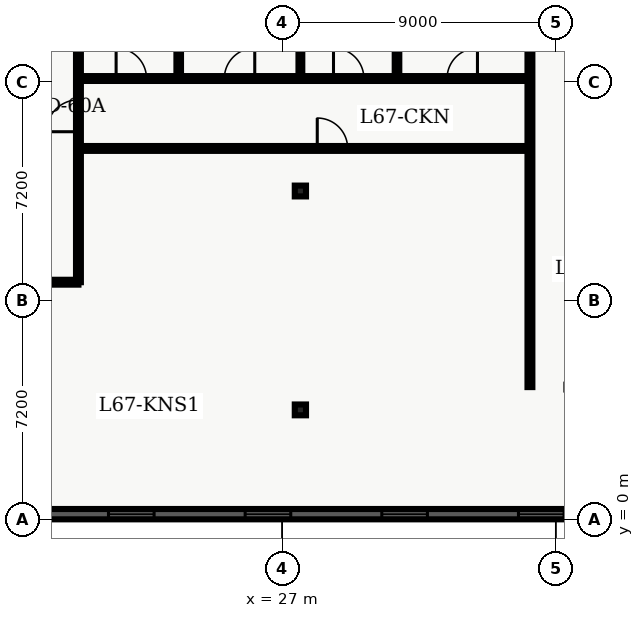
"""IFC4 building model, lengths in metres.
Left out: names, types, materials, properties, quantities, classifications, styles, units other than length and angle.
Written with IfcOpenShell. Run it as: python <this file> out.ifc"""

import sys

from ifc_helpers import new_model, entity, si_unit, converted_unit, direction, frame, origin_with_axes, origin_2d_with_axis, place, context, subcontext, project, spatial, polyline, rectangle, i_section, outline, extrude, element, fill, save


model = new_model("IFC4")
c1 = context("Model", 3, precision=1e-05, world=origin_with_axes(), true_north=direction((0.0, 1.0)))
c2 = subcontext(c1, "Body", "Model", "MODEL_VIEW")
j1 = project(units=[si_unit("LENGTHUNIT", "METRE"), converted_unit("PLANEANGLEUNIT", "DEGREE", entity("IfcPlaneAngleMeasure", 0.017), si_unit("PLANEANGLEUNIT", "RADIAN"), dimensions=[0, 0, 0, 0, 0, 0, 0])], contexts=[c1])
p1 = place(None, origin_with_axes())
s1 = spatial("IfcSite", under=j1, at=p1, CompositionType="ELEMENT")
p2 = place(p1, origin_with_axes())
s2 = spatial("IfcBuilding", under=s1, at=p2, CompositionType="ELEMENT")
p3 = place(p2, frame((0.0, 0.0, 272.4), z_axis=(0.0, 0.0, 1.0), x_axis=(1.0, 0.0, 0.0)))
s3 = spatial("IfcBuildingStorey", under=s2, at=p3, CompositionType="ELEMENT", Elevation=272.4)
for number, where, z_axis, x_axis in (
    (1, (27.6, 3.6, 0.0), (0.0, 0.0, 1.0), (1.0, 0.0, 0.0)),
    (2, (27.6, 10.8, 0.0), (0.0, 0.0, 1.0), (1.0, 0.0, 0.0)),
):
    element("IfcColumn", number, at=place(p3, frame(where, z_axis=z_axis, x_axis=x_axis)), inside=s3, PredefinedType="COLUMN", context=c2, shape_type="SweptSolid", body=[
        extrude(i_section(OverallWidth=0.369, OverallDepth=0.356, WebThickness=0.011, FlangeThickness=0.018, FilletRadius=0.018, at=origin_2d_with_axis()), origin_with_axes(), (0.0, 0.0, 1.0), 3.9),
    ])
p4 = place(p3, frame((8.135, 7.8, 0.0), z_axis=(0.0, 0.0, 1.0), x_axis=(1.0, 0.0, 0.0)))
e3 = element("IfcWall", 3, at=p4, inside=s3, PredefinedType="PARTITIONING", context=c2, shape_type="SweptSolid", body=[
    extrude(outline(polyline([(0.0, -0.08), (12.165, -0.08), (12.165, 0.08), (0.0, 0.08), (0.0, -0.08)])), origin_with_axes(), (0.0, 0.0, 1.0), 2.7),
])
p5 = place(p4, frame((3.994, 0.0, 0.0), z_axis=(0.0, 0.0, 1.0), x_axis=(1.0, 0.0, 0.0)))
e4 = element("IfcOpeningElement", 4, at=p5, cuts=e3, PredefinedType="OPENING", context=c2, shape_type="SweptSolid", body=[
    extrude(rectangle(XDim=1.0, YDim=0.18, at=origin_2d_with_axis()), origin_with_axes(), (0.0, 0.0, 1.0), 2.15),
])
p6 = place(p4, frame((8.794, 0.0, 0.0), z_axis=(0.0, 0.0, 1.0), x_axis=(1.0, 0.0, 0.0)))
e5 = element("IfcOpeningElement", 5, at=p6, cuts=e3, PredefinedType="OPENING", context=c2, shape_type="SweptSolid", body=[
    extrude(rectangle(XDim=1.0, YDim=0.18, at=origin_2d_with_axis()), origin_with_axes(), (0.0, 0.0, 1.0), 2.15),
])
p7 = place(p3, frame((20.3, 7.8, 0.0), z_axis=(0.0, 0.0, 1.0), x_axis=(0.0, 1.0, 0.0)))
e6 = element("IfcWall", 6, at=p7, inside=s3, PredefinedType="PARTITIONING", context=c2, shape_type="SweptSolid", body=[
    extrude(outline(polyline([(0.0, -0.08), (32.7, -0.08), (32.7, 0.08), (0.0, 0.08), (0.0, -0.08)])), origin_with_axes(), (0.0, 0.0, 1.0), 2.7),
])
p8 = place(p7, frame((14.2, 0.0, 0.0), z_axis=(0.0, 0.0, 1.0), x_axis=(1.0, 0.0, 0.0)))
e7 = element("IfcOpeningElement", 7, at=p8, cuts=e6, PredefinedType="OPENING", context=c2, shape_type="SweptSolid", body=[
    extrude(rectangle(XDim=1.0, YDim=0.18, at=origin_2d_with_axis()), origin_with_axes(), (0.0, 0.0, 1.0), 2.15),
])
p9 = place(p7, frame((18.779, 0.0, 0.0), z_axis=(0.0, 0.0, 1.0), x_axis=(1.0, 0.0, 0.0)))
e8 = element("IfcOpeningElement", 8, at=p9, cuts=e6, PredefinedType="OPENING", context=c2, shape_type="SweptSolid", body=[
    extrude(rectangle(XDim=1.0, YDim=0.18, at=origin_2d_with_axis()), origin_with_axes(), (0.0, 0.0, 1.0), 2.15),
])
p10 = place(p7, frame((23.784, 0.0, 0.0), z_axis=(0.0, 0.0, 1.0), x_axis=(1.0, 0.0, 0.0)))
e9 = element("IfcOpeningElement", 9, at=p10, cuts=e6, PredefinedType="OPENING", context=c2, shape_type="SweptSolid", body=[
    extrude(rectangle(XDim=1.0, YDim=0.18, at=origin_2d_with_axis()), origin_with_axes(), (0.0, 0.0, 1.0), 2.15),
])
p11 = place(p7, frame((27.651, 0.0, 0.0), z_axis=(0.0, 0.0, 1.0), x_axis=(1.0, 0.0, 0.0)))
e10 = element("IfcOpeningElement", 10, at=p11, cuts=e6, PredefinedType="OPENING", context=c2, shape_type="SweptSolid", body=[
    extrude(rectangle(XDim=1.0, YDim=0.18, at=origin_2d_with_axis()), origin_with_axes(), (0.0, 0.0, 1.0), 2.15),
])
p12 = place(p7, frame((5.475, 0.0, 0.0), z_axis=(0.0, 0.0, 1.0), x_axis=(1.0, 0.0, 0.0)))
e11 = element("IfcOpeningElement", 11, at=p12, cuts=e6, PredefinedType="OPENING", context=c2, shape_type="SweptSolid", body=[
    extrude(rectangle(XDim=1.05, YDim=0.18, at=origin_2d_with_axis()), origin_with_axes(), (0.0, 0.0, 1.0), 2.15),
])
p13 = place(p3, frame((20.3, 12.2, 0.0), z_axis=(0.0, 0.0, 1.0), x_axis=(1.0, 0.0, 0.0)))
e12 = element("IfcWall", 12, at=p13, inside=s3, PredefinedType="PARTITIONING", context=c2, shape_type="SweptSolid", body=[
    extrude(outline(polyline([(0.0, -0.08), (14.85, -0.08), (14.85, 0.08), (0.0, 0.08), (0.0, -0.08)])), origin_with_axes(), (0.0, 0.0, 1.0), 2.7),
])
p14 = place(p13, frame((8.355, 0.0, 0.0), z_axis=(0.0, 0.0, 1.0), x_axis=(1.0, 0.0, 0.0)))
e13 = element("IfcOpeningElement", 13, at=p14, cuts=e12, PredefinedType="OPENING", context=c2, shape_type="SweptSolid", body=[
    extrude(rectangle(XDim=1.0, YDim=0.18, at=origin_2d_with_axis()), origin_with_axes(), (0.0, 0.0, 1.0), 2.15),
])
p15 = place(p3, frame((20.3, 14.5, 0.0), z_axis=(0.0, 0.0, 1.0), x_axis=(1.0, 0.0, 0.0)))
e14 = element("IfcWall", 14, at=p15, inside=s3, PredefinedType="PARTITIONING", context=c2, shape_type="SweptSolid", body=[
    extrude(outline(polyline([(0.0, -0.08), (14.85, -0.08), (14.85, 0.08), (0.0, 0.08), (0.0, -0.08)])), origin_with_axes(), (0.0, 0.0, 1.0), 2.7),
])
p16 = place(p15, frame((1.739, 0.0, 0.0), z_axis=(0.0, 0.0, 1.0), x_axis=(1.0, 0.0, 0.0)))
e15 = element("IfcOpeningElement", 15, at=p16, cuts=e14, PredefinedType="OPENING", context=c2, shape_type="SweptSolid", body=[
    extrude(rectangle(XDim=1.0, YDim=0.18, at=origin_2d_with_axis()), origin_with_axes(), (0.0, 0.0, 1.0), 2.15),
])
p17 = place(p15, frame((5.299, 0.0, 0.0), z_axis=(0.0, 0.0, 1.0), x_axis=(1.0, 0.0, 0.0)))
e16 = element("IfcOpeningElement", 16, at=p17, cuts=e14, PredefinedType="OPENING", context=c2, shape_type="SweptSolid", body=[
    extrude(rectangle(XDim=1.0, YDim=0.18, at=origin_2d_with_axis()), origin_with_axes(), (0.0, 0.0, 1.0), 2.15),
])
p18 = place(p15, frame((8.889, 0.0, 0.0), z_axis=(0.0, 0.0, 1.0), x_axis=(1.0, 0.0, 0.0)))
e17 = element("IfcOpeningElement", 17, at=p18, cuts=e14, PredefinedType="OPENING", context=c2, shape_type="SweptSolid", body=[
    extrude(rectangle(XDim=1.0, YDim=0.18, at=origin_2d_with_axis()), origin_with_axes(), (0.0, 0.0, 1.0), 2.15),
])
p19 = place(p15, frame((12.624, 0.0, 0.0), z_axis=(0.0, 0.0, 1.0), x_axis=(1.0, 0.0, 0.0)))
e18 = element("IfcOpeningElement", 18, at=p19, cuts=e14, PredefinedType="OPENING", context=c2, shape_type="SweptSolid", body=[
    extrude(rectangle(XDim=1.0, YDim=0.18, at=origin_2d_with_axis()), origin_with_axes(), (0.0, 0.0, 1.0), 2.15),
])
p20 = place(p3, frame((35.15, 4.35, 0.0), z_axis=(0.0, 0.0, 1.0), x_axis=(0.0, 1.0, 0.0)))
e19 = element("IfcWall", 19, at=p20, inside=s3, PredefinedType="PARTITIONING", context=c2, shape_type="SweptSolid", body=[
    extrude(outline(polyline([(0.0, -0.08), (16.95, -0.08), (16.95, 0.08), (0.0, 0.08), (0.0, -0.08)])), origin_with_axes(), (0.0, 0.0, 1.0), 2.7),
])
p21 = place(p3, frame((23.598, 14.62, 0.0), z_axis=(0.0, 0.0, 1.0), x_axis=(0.0, 1.0, 0.0)))
e20 = element("IfcWall", 20, at=p21, inside=s3, PredefinedType="PARTITIONING", context=c2, shape_type="SweptSolid", body=[
    extrude(outline(polyline([(0.0, -0.075), (6.6, -0.075), (6.6, 0.075), (0.0, 0.075), (0.0, -0.075)])), origin_with_axes(), (0.0, 0.0, 1.0), 2.7),
])
p22 = place(p3, frame((27.6, 14.62, 0.0), z_axis=(0.0, 0.0, 1.0), x_axis=(0.0, 1.0, 0.0)))
e21 = element("IfcWall", 21, at=p22, inside=s3, PredefinedType="PARTITIONING", context=c2, shape_type="SweptSolid", body=[
    extrude(outline(polyline([(0.0, -0.062), (6.6, -0.062), (6.6, 0.062), (0.0, 0.062), (0.0, -0.062)])), origin_with_axes(), (0.0, 0.0, 1.0), 2.7),
])
p23 = place(p3, frame((30.778, 14.62, 0.0), z_axis=(0.0, 0.0, 1.0), x_axis=(0.0, 1.0, 0.0)))
e22 = element("IfcWall", 22, at=p23, inside=s3, PredefinedType="PARTITIONING", context=c2, shape_type="SweptSolid", body=[
    extrude(outline(polyline([(0.0, -0.075), (6.6, -0.075), (6.6, 0.075), (0.0, 0.075), (0.0, -0.075)])), origin_with_axes(), (0.0, 0.0, 1.0), 2.7),
])
p24 = place(p3, frame((47.36, 0.17, 0.0), z_axis=(0.0, 0.0, 1.0), x_axis=(-1.0, 0.0, 0.0)))
e23 = element("IfcWall", 23, at=p24, inside=s3, PredefinedType="SOLIDWALL", context=c2, shape_type="SweptSolid", body=[
    extrude(outline(polyline([(0.0, -0.17), (37.16, -0.17), (37.16, 0.17), (0.0, 0.17), (0.0, -0.17)])), origin_with_axes(), (0.0, 0.0, 1.0), 3.66),
])
p25 = place(p24, frame((2.847, 0.0, 0.45), z_axis=(0.0, 0.0, 1.0), x_axis=(1.0, 0.0, 0.0)))
e24 = element("IfcOpeningElement", 24, at=p25, cuts=e23, PredefinedType="OPENING", context=c2, shape_type="SweptSolid", body=[
    extrude(rectangle(XDim=1.5, YDim=0.36, at=origin_2d_with_axis()), origin_with_axes(), (0.0, 0.0, 1.0), 2.1),
])
p26 = place(p24, frame((7.342, 0.0, 0.45), z_axis=(0.0, 0.0, 1.0), x_axis=(1.0, 0.0, 0.0)))
e25 = element("IfcOpeningElement", 25, at=p26, cuts=e23, PredefinedType="OPENING", context=c2, shape_type="SweptSolid", body=[
    extrude(rectangle(XDim=1.5, YDim=0.36, at=origin_2d_with_axis()), origin_with_axes(), (0.0, 0.0, 1.0), 2.1),
])
p27 = place(p24, frame((11.837, 0.0, 0.45), z_axis=(0.0, 0.0, 1.0), x_axis=(1.0, 0.0, 0.0)))
e26 = element("IfcOpeningElement", 26, at=p27, cuts=e23, PredefinedType="OPENING", context=c2, shape_type="SweptSolid", body=[
    extrude(rectangle(XDim=1.5, YDim=0.36, at=origin_2d_with_axis()), origin_with_axes(), (0.0, 0.0, 1.0), 2.1),
])
p28 = place(p24, frame((16.332, 0.0, 0.45), z_axis=(0.0, 0.0, 1.0), x_axis=(1.0, 0.0, 0.0)))
e27 = element("IfcOpeningElement", 27, at=p28, cuts=e23, PredefinedType="OPENING", context=c2, shape_type="SweptSolid", body=[
    extrude(rectangle(XDim=1.5, YDim=0.36, at=origin_2d_with_axis()), origin_with_axes(), (0.0, 0.0, 1.0), 2.1),
])
p29 = place(p24, frame((20.827, 0.0, 0.45), z_axis=(0.0, 0.0, 1.0), x_axis=(1.0, 0.0, 0.0)))
e28 = element("IfcOpeningElement", 28, at=p29, cuts=e23, PredefinedType="OPENING", context=c2, shape_type="SweptSolid", body=[
    extrude(rectangle(XDim=1.5, YDim=0.36, at=origin_2d_with_axis()), origin_with_axes(), (0.0, 0.0, 1.0), 2.1),
])
p30 = place(p24, frame((25.322, 0.0, 0.45), z_axis=(0.0, 0.0, 1.0), x_axis=(1.0, 0.0, 0.0)))
e29 = element("IfcOpeningElement", 29, at=p30, cuts=e23, PredefinedType="OPENING", context=c2, shape_type="SweptSolid", body=[
    extrude(rectangle(XDim=1.5, YDim=0.36, at=origin_2d_with_axis()), origin_with_axes(), (0.0, 0.0, 1.0), 2.1),
])
p31 = place(p24, frame((29.817, 0.0, 0.45), z_axis=(0.0, 0.0, 1.0), x_axis=(1.0, 0.0, 0.0)))
e30 = element("IfcOpeningElement", 30, at=p31, cuts=e23, PredefinedType="OPENING", context=c2, shape_type="SweptSolid", body=[
    extrude(rectangle(XDim=1.5, YDim=0.36, at=origin_2d_with_axis()), origin_with_axes(), (0.0, 0.0, 1.0), 2.1),
])
p32 = place(p24, frame((34.312, 0.0, 0.45), z_axis=(0.0, 0.0, 1.0), x_axis=(1.0, 0.0, 0.0)))
e31 = element("IfcOpeningElement", 31, at=p32, cuts=e23, PredefinedType="OPENING", context=c2, shape_type="SweptSolid", body=[
    extrude(rectangle(XDim=1.5, YDim=0.36, at=origin_2d_with_axis()), origin_with_axes(), (0.0, 0.0, 1.0), 2.1),
])
p33 = place(p7, frame((5.475, 0.0, 0.0), z_axis=(0.0, 0.0, 1.0), x_axis=(1.0, 0.0, 0.0)))
e32 = element("IfcDoor", 32, at=p33, inside=s3, OperationType="SINGLE_SWING_LEFT", PredefinedType="DOOR", context=c2, shape_type="SweptSolid", body=[
    extrude(rectangle(XDim=1.05, YDim=0.09, at=origin_2d_with_axis()), origin_with_axes(), (0.0, 0.0, 1.0), 2.15),
])
fill(e11, e32)
p34 = place(p13, frame((8.355, 0.0, 0.0), z_axis=(0.0, 0.0, 1.0), x_axis=(1.0, 0.0, 0.0)))
e33 = element("IfcDoor", 33, at=p34, inside=s3, OperationType="SINGLE_SWING_LEFT", PredefinedType="DOOR", context=c2, shape_type="SweptSolid", body=[
    extrude(rectangle(XDim=1.0, YDim=0.09, at=origin_2d_with_axis()), origin_with_axes(), (0.0, 0.0, 1.0), 2.15),
])
fill(e13, e33)
p35 = place(p15, frame((1.739, 0.0, 0.0), z_axis=(0.0, 0.0, 1.0), x_axis=(1.0, 0.0, 0.0)))
e34 = element("IfcDoor", 34, at=p35, inside=s3, OperationType="SINGLE_SWING_LEFT", PredefinedType="DOOR", context=c2, shape_type="SweptSolid", body=[
    extrude(rectangle(XDim=1.0, YDim=0.09, at=origin_2d_with_axis()), origin_with_axes(), (0.0, 0.0, 1.0), 2.15),
])
fill(e15, e34)
p36 = place(p15, frame((5.299, 0.0, 0.0), z_axis=(0.0, 0.0, 1.0), x_axis=(1.0, 0.0, 0.0)))
e35 = element("IfcDoor", 35, at=p36, inside=s3, OperationType="SINGLE_SWING_RIGHT", PredefinedType="DOOR", context=c2, shape_type="SweptSolid", body=[
    extrude(rectangle(XDim=1.0, YDim=0.09, at=origin_2d_with_axis()), origin_with_axes(), (0.0, 0.0, 1.0), 2.15),
])
fill(e16, e35)
p37 = place(p15, frame((8.889, 0.0, 0.0), z_axis=(0.0, 0.0, 1.0), x_axis=(1.0, 0.0, 0.0)))
e36 = element("IfcDoor", 36, at=p37, inside=s3, OperationType="SINGLE_SWING_LEFT", PredefinedType="DOOR", context=c2, shape_type="SweptSolid", body=[
    extrude(rectangle(XDim=1.0, YDim=0.09, at=origin_2d_with_axis()), origin_with_axes(), (0.0, 0.0, 1.0), 2.15),
])
fill(e17, e36)
p38 = place(p15, frame((12.624, 0.0, 0.0), z_axis=(0.0, 0.0, 1.0), x_axis=(1.0, 0.0, 0.0)))
e37 = element("IfcDoor", 37, at=p38, inside=s3, OperationType="SINGLE_SWING_RIGHT", PredefinedType="DOOR", context=c2, shape_type="SweptSolid", body=[
    extrude(rectangle(XDim=1.0, YDim=0.09, at=origin_2d_with_axis()), origin_with_axes(), (0.0, 0.0, 1.0), 2.15),
])
fill(e18, e37)
p39 = place(p24, frame((11.837, 0.0, 0.45), z_axis=(0.0, 0.0, 1.0), x_axis=(1.0, 0.0, 0.0)))
e38 = element("IfcWindow", 38, at=p39, inside=s3, PredefinedType="WINDOW", context=c2, shape_type="SweptSolid", body=[
    extrude(rectangle(XDim=1.5, YDim=0.09, at=origin_2d_with_axis()), origin_with_axes(), (0.0, 0.0, 1.0), 2.1),
])
fill(e26, e38)
p40 = place(p24, frame((16.332, 0.0, 0.45), z_axis=(0.0, 0.0, 1.0), x_axis=(1.0, 0.0, 0.0)))
e39 = element("IfcWindow", 39, at=p40, inside=s3, PredefinedType="WINDOW", context=c2, shape_type="SweptSolid", body=[
    extrude(rectangle(XDim=1.5, YDim=0.09, at=origin_2d_with_axis()), origin_with_axes(), (0.0, 0.0, 1.0), 2.1),
])
fill(e27, e39)
p41 = place(p24, frame((20.827, 0.0, 0.45), z_axis=(0.0, 0.0, 1.0), x_axis=(1.0, 0.0, 0.0)))
e40 = element("IfcWindow", 40, at=p41, inside=s3, PredefinedType="WINDOW", context=c2, shape_type="SweptSolid", body=[
    extrude(rectangle(XDim=1.5, YDim=0.09, at=origin_2d_with_axis()), origin_with_axes(), (0.0, 0.0, 1.0), 2.1),
])
fill(e28, e40)
p42 = place(p24, frame((25.322, 0.0, 0.45), z_axis=(0.0, 0.0, 1.0), x_axis=(1.0, 0.0, 0.0)))
e41 = element("IfcWindow", 41, at=p42, inside=s3, PredefinedType="WINDOW", context=c2, shape_type="SweptSolid", body=[
    extrude(rectangle(XDim=1.5, YDim=0.09, at=origin_2d_with_axis()), origin_with_axes(), (0.0, 0.0, 1.0), 2.1),
])
fill(e29, e41)
save(model, sys.argv[1])
